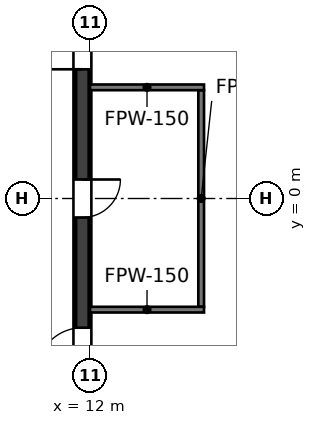
"""IFC4 building model, lengths in metres.
Left out: names, types, materials, properties, quantities, classifications, styles, units other than length and angle.
Written with IfcOpenShell. Run it as: python <this file> out.ifc"""

import sys

from ifc_helpers import new_model, si_unit, direction, frame, frame_2d, origin, place, context, subcontext, project, spatial, rectangle, extrude, element, fill, save


model = new_model("IFC4")
c1 = context("Model", 3, precision=1e-05, world=origin(), true_north=direction((0.0, 1.0)))
c2 = subcontext(c1, "Body", "Model", "MODEL_VIEW")
j1 = project(units=[si_unit("LENGTHUNIT", "METRE"), si_unit("PLANEANGLEUNIT", "RADIAN")], contexts=[c1])
p1 = place(None, origin())
s1 = spatial("IfcSite", under=j1, at=p1, CompositionType="ELEMENT")
p2 = place(p1, origin())
s2 = spatial("IfcBuilding", under=s1, at=p2, CompositionType="ELEMENT")
p3 = place(p2, frame((0.0, 0.0, 237.6)))
s3 = spatial("IfcBuildingStorey", under=s2, at=p3, CompositionType="ELEMENT", Elevation=237.6)
p4 = place(p3, frame((11.8, -5.5, 0.0), z_axis=(0.0, 0.0, 1.0), x_axis=(0.0, 1.0, 0.0)))
e1 = element("IfcWall", 1, at=p4, inside=s3, PredefinedType="SHEAR", context=c2, shape_type="SweptSolid", body=[
    extrude(rectangle(XDim=11.0, YDim=0.4, at=frame_2d((5.5, 0.0))), origin(), (0.0, 0.0, 1.0), 4.0),
])
p5 = place(p4, frame((5.0, 0.0, 0.0)))
e2 = element("IfcOpeningElement", 2, at=p5, cuts=e1, PredefinedType="OPENING", context=c2, shape_type="SweptSolid", body=[
    extrude(rectangle(XDim=1.0, YDim=2.1, at=frame_2d((0.5, 1.05))), frame((0.0, 0.2, 0.0), z_axis=(0.0, -1.0, 0.0), x_axis=(1.0, 0.0, 0.0)), (0.0, 0.0, 1.0), 0.4),
])
p6 = place(p4, frame((0.9, 0.0, 0.0)))
e3 = element("IfcOpeningElement", 3, at=p6, cuts=e1, PredefinedType="OPENING", context=c2, shape_type="SweptSolid", body=[
    extrude(rectangle(XDim=1.2, YDim=2.1, at=frame_2d((0.6, 1.05))), frame((0.0, 0.2, 0.0), z_axis=(0.0, -1.0, 0.0), x_axis=(1.0, 0.0, 0.0)), (0.0, 0.0, 1.0), 0.4),
])
p7 = place(p4, frame((8.9, 0.0, 0.0)))
e4 = element("IfcOpeningElement", 4, at=p7, cuts=e1, PredefinedType="OPENING", context=c2, shape_type="SweptSolid", body=[
    extrude(rectangle(XDim=1.2, YDim=2.1, at=frame_2d((0.6, 1.05))), frame((0.0, 0.2, 0.0), z_axis=(0.0, -1.0, 0.0), x_axis=(1.0, 0.0, 0.0)), (0.0, 0.0, 1.0), 0.4),
])
p8 = place(p3, frame((14.925, -2.85, 0.0), z_axis=(0.0, 0.0, 1.0), x_axis=(0.0, 1.0, 0.0)))
e5 = element("IfcWall", 5, at=p8, inside=s3, PredefinedType="PARTITIONING", context=c2, shape_type="SweptSolid", body=[
    extrude(rectangle(XDim=5.7, YDim=0.15, at=frame_2d((2.85, 0.0))), origin(), (0.0, 0.0, 1.0), 2.768),
])
for number, where, z_axis, x_axis in (
    (6, (12.0, 2.925, 0.0), (0.0, 0.0, 1.0), (1.0, 0.0, 0.0)),
    (7, (12.0, -2.925, 0.0), (0.0, 0.0, 1.0), (1.0, 0.0, 0.0)),
):
    element("IfcWall", number, at=place(p3, frame(where, z_axis=z_axis, x_axis=x_axis)), inside=s3, PredefinedType="PARTITIONING", context=c2, shape_type="SweptSolid", body=[
        extrude(rectangle(XDim=3.0, YDim=0.15, at=frame_2d((1.5, 0.0))), origin(), (0.0, 0.0, 1.0), 2.768),
    ])
p9 = place(p5, origin())
e8 = element("IfcDoor", 8, at=p9, inside=s3, OperationType="SINGLE_SWING_RIGHT", PredefinedType="DOOR", context=c2, shape_type="SweptSolid", body=[
    extrude(rectangle(XDim=1.0, YDim=2.1, at=frame_2d((0.5, 1.05))), frame((0.0, 0.025, 0.0), z_axis=(0.0, -1.0, 0.0), x_axis=(1.0, 0.0, 0.0)), (0.0, 0.0, 1.0), 0.05),
])
fill(e2, e8)
p10 = place(p6, origin())
e9 = element("IfcDoor", 9, at=p10, inside=s3, OperationType="SINGLE_SWING_LEFT", PredefinedType="DOOR", context=c2, shape_type="SweptSolid", body=[
    extrude(rectangle(XDim=1.2, YDim=2.1, at=frame_2d((0.6, 1.05))), frame((0.0, 0.025, 0.0), z_axis=(0.0, -1.0, 0.0), x_axis=(1.0, 0.0, 0.0)), (0.0, 0.0, 1.0), 0.05),
])
fill(e3, e9)
p11 = place(p7, origin())
e10 = element("IfcDoor", 10, at=p11, inside=s3, OperationType="SINGLE_SWING_LEFT", PredefinedType="DOOR", context=c2, shape_type="SweptSolid", body=[
    extrude(rectangle(XDim=1.2, YDim=2.1, at=frame_2d((0.6, 1.05))), frame((0.0, 0.025, 0.0), z_axis=(0.0, -1.0, 0.0), x_axis=(1.0, 0.0, 0.0)), (0.0, 0.0, 1.0), 0.05),
])
fill(e4, e10)
save(model, sys.argv[1])
